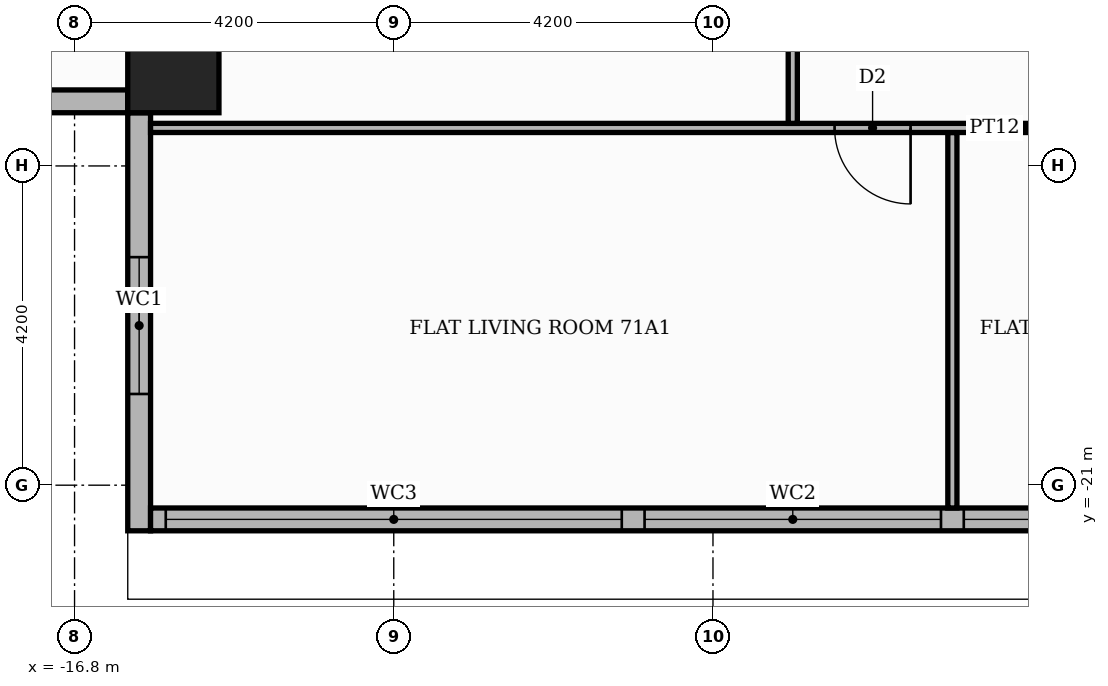
"""IFC4 building model, lengths in metres.
Left out: names, types, materials, properties, quantities, classifications, styles, units other than length and angle.
Written with IfcOpenShell. Run it as: python <this file> out.ifc"""

import sys

from ifc_helpers import new_model, si_unit, direction, frame, frame_2d, origin, origin_2d, place, context, subcontext, project, spatial, rectangle, extrude, element, fill, save


model = new_model("IFC4")
c1 = context("Model", 3, precision=1e-05, world=origin(), true_north=direction((0.0, 1.0)))
c2 = subcontext(c1, "Body", "Model", "MODEL_VIEW")
j1 = project(units=[si_unit("LENGTHUNIT", "METRE"), si_unit("PLANEANGLEUNIT", "RADIAN")], contexts=[c1])
p1 = place(None, origin())
s1 = spatial("IfcSite", under=j1, at=p1, CompositionType="ELEMENT")
p2 = place(p1, origin())
s2 = spatial("IfcBuilding", under=s1, at=p2, CompositionType="ELEMENT")
p3 = place(p2, frame((0.0, 0.0, 296.7)))
s3 = spatial("IfcBuildingStorey", under=s2, at=p3, CompositionType="ELEMENT", Elevation=296.7)
p4 = place(p3, frame((-15.5, -15.5, 0.0), z_axis=(0.0, 0.0, 1.0), x_axis=(1.0, 0.0, 0.0)))
e1 = element("IfcColumn", 1, at=p4, inside=s3, PredefinedType="COLUMN", context=c2, shape_type="SweptSolid", body=[
    extrude(rectangle(XDim=1.2, YDim=1.2, at=origin_2d()), origin(), (0.0, 0.0, 1.0), 3.9),
])
p5 = place(p3, frame((-21.3, -15.95, 0.0), z_axis=(0.0, 0.0, 1.0), x_axis=(1.0, 0.0, 0.0)))
e2 = element("IfcWall", 2, at=p5, inside=s3, PredefinedType="STANDARD", context=c2, shape_type="SweptSolid", body=[
    extrude(rectangle(XDim=5.2, YDim=0.3, at=frame_2d((2.6, 0.0))), origin(), (0.0, 0.0, 1.0), 3.55),
])
p6 = place(p5, frame((1.5, 0.0, 0.6)))
e3 = element("IfcOpeningElement", 3, at=p6, cuts=e2, PredefinedType="OPENING", context=c2, shape_type="SweptSolid", body=[
    extrude(rectangle(XDim=1.8, YDim=2.4, at=frame_2d((0.9, 1.2))), frame((0.0, 0.16, 0.0), z_axis=(0.0, -1.0, 0.0), x_axis=(1.0, 0.0, 0.0)), (0.0, 0.0, 1.0), 0.32),
])
p7 = place(p3, frame((-15.95, -16.1, 0.0), z_axis=(0.0, 0.0, 1.0), x_axis=(0.0, -1.0, 0.0)))
e4 = element("IfcWall", 4, at=p7, inside=s3, PredefinedType="STANDARD", context=c2, shape_type="SweptSolid", body=[
    extrude(rectangle(XDim=5.5, YDim=0.3, at=frame_2d((2.75, 0.0))), origin(), (0.0, 0.0, 1.0), 3.55),
])
p8 = place(p7, frame((1.9, 0.0, 0.6)))
e5 = element("IfcOpeningElement", 5, at=p8, cuts=e4, PredefinedType="OPENING", context=c2, shape_type="SweptSolid", body=[
    extrude(rectangle(XDim=1.8, YDim=2.4, at=frame_2d((0.9, 1.2))), frame((0.0, 0.16, 0.0), z_axis=(0.0, -1.0, 0.0), x_axis=(1.0, 0.0, 0.0)), (0.0, 0.0, 1.0), 0.32),
])
p9 = place(p3, frame((-15.8, -21.45, 0.0), z_axis=(0.0, 0.0, 1.0), x_axis=(1.0, 0.0, 0.0)))
e6 = element("IfcWall", 6, at=p9, inside=s3, PredefinedType="STANDARD", context=c2, shape_type="SweptSolid", body=[
    extrude(rectangle(XDim=31.9, YDim=0.3, at=frame_2d((15.95, 0.0))), origin(), (0.0, 0.0, 1.0), 3.55),
])
p10 = place(p9, frame((0.2, 0.0, 0.6)))
e7 = element("IfcOpeningElement", 7, at=p10, cuts=e6, PredefinedType="OPENING", context=c2, shape_type="SweptSolid", body=[
    extrude(rectangle(XDim=6.0, YDim=2.4, at=frame_2d((3.0, 1.2))), frame((0.0, 0.16, 0.0), z_axis=(0.0, -1.0, 0.0), x_axis=(1.0, 0.0, 0.0)), (0.0, 0.0, 1.0), 0.32),
])
p11 = place(p9, frame((6.5, 0.0, 0.6)))
e8 = element("IfcOpeningElement", 8, at=p11, cuts=e6, PredefinedType="OPENING", context=c2, shape_type="SweptSolid", body=[
    extrude(rectangle(XDim=3.9, YDim=2.4, at=frame_2d((1.95, 1.2))), frame((0.0, 0.16, 0.0), z_axis=(0.0, -1.0, 0.0), x_axis=(1.0, 0.0, 0.0)), (0.0, 0.0, 1.0), 0.32),
])
p12 = place(p9, frame((10.7, 0.0, 0.6)))
e9 = element("IfcOpeningElement", 9, at=p12, cuts=e6, PredefinedType="OPENING", context=c2, shape_type="SweptSolid", body=[
    extrude(rectangle(XDim=3.9, YDim=2.4, at=frame_2d((1.95, 1.2))), frame((0.0, 0.16, 0.0), z_axis=(0.0, -1.0, 0.0), x_axis=(1.0, 0.0, 0.0)), (0.0, 0.0, 1.0), 0.32),
])
p13 = place(p9, frame((14.9, 0.0, 0.6)))
e10 = element("IfcOpeningElement", 10, at=p13, cuts=e6, PredefinedType="OPENING", context=c2, shape_type="SweptSolid", body=[
    extrude(rectangle(XDim=3.9, YDim=2.4, at=frame_2d((1.95, 1.2))), frame((0.0, 0.16, 0.0), z_axis=(0.0, -1.0, 0.0), x_axis=(1.0, 0.0, 0.0)), (0.0, 0.0, 1.0), 0.32),
])
p14 = place(p9, frame((19.1, 0.0, 0.6)))
e11 = element("IfcOpeningElement", 11, at=p14, cuts=e6, PredefinedType="OPENING", context=c2, shape_type="SweptSolid", body=[
    extrude(rectangle(XDim=1.8, YDim=2.4, at=frame_2d((0.9, 1.2))), frame((0.0, 0.16, 0.0), z_axis=(0.0, -1.0, 0.0), x_axis=(1.0, 0.0, 0.0)), (0.0, 0.0, 1.0), 0.32),
])
p15 = place(p9, frame((21.2, 0.0, 0.6)))
e12 = element("IfcOpeningElement", 12, at=p15, cuts=e6, PredefinedType="OPENING", context=c2, shape_type="SweptSolid", body=[
    extrude(rectangle(XDim=1.8, YDim=2.4, at=frame_2d((0.9, 1.2))), frame((0.0, 0.16, 0.0), z_axis=(0.0, -1.0, 0.0), x_axis=(1.0, 0.0, 0.0)), (0.0, 0.0, 1.0), 0.32),
])
p16 = place(p9, frame((23.3, 0.0, 0.6)))
e13 = element("IfcOpeningElement", 13, at=p16, cuts=e6, PredefinedType="OPENING", context=c2, shape_type="SweptSolid", body=[
    extrude(rectangle(XDim=6.0, YDim=2.4, at=frame_2d((3.0, 1.2))), frame((0.0, 0.16, 0.0), z_axis=(0.0, -1.0, 0.0), x_axis=(1.0, 0.0, 0.0)), (0.0, 0.0, 1.0), 0.32),
])
p17 = place(p3, frame((-5.25, -21.3, 0.0), z_axis=(0.0, 0.0, 1.0), x_axis=(0.0, 1.0, 0.0)))
e14 = element("IfcWall", 14, at=p17, inside=s3, PredefinedType="PARTITIONING", context=c2, shape_type="SweptSolid", body=[
    extrude(rectangle(XDim=4.94, YDim=0.12, at=frame_2d((2.47, 0.0))), origin(), (0.0, 0.0, 1.0), 3.55),
])
p18 = place(p3, frame((-15.8, -16.3, 0.0), z_axis=(0.0, 0.0, 1.0), x_axis=(1.0, 0.0, 0.0)))
e15 = element("IfcWall", 15, at=p18, inside=s3, PredefinedType="PARTITIONING", context=c2, shape_type="SweptSolid", body=[
    extrude(rectangle(XDim=23.05, YDim=0.12, at=frame_2d((11.525, 0.0))), origin(), (0.0, 0.0, 1.0), 3.55),
])
p19 = place(p18, frame((9.0, 0.0, 0.0)))
e16 = element("IfcOpeningElement", 16, at=p19, cuts=e15, PredefinedType="OPENING", context=c2, shape_type="SweptSolid", body=[
    extrude(rectangle(XDim=1.0, YDim=2.1, at=frame_2d((0.5, 1.05))), frame((0.0, 0.07, 0.0), z_axis=(0.0, -1.0, 0.0), x_axis=(1.0, 0.0, 0.0)), (0.0, 0.0, 1.0), 0.14),
])
p20 = place(p18, frame((12.15, 0.0, 0.0)))
e17 = element("IfcOpeningElement", 17, at=p20, cuts=e15, PredefinedType="OPENING", context=c2, shape_type="SweptSolid", body=[
    extrude(rectangle(XDim=1.0, YDim=2.1, at=frame_2d((0.5, 1.05))), frame((0.0, 0.07, 0.0), z_axis=(0.0, -1.0, 0.0), x_axis=(1.0, 0.0, 0.0)), (0.0, 0.0, 1.0), 0.14),
])
p21 = place(p18, frame((16.4, 0.0, 0.0)))
e18 = element("IfcOpeningElement", 18, at=p21, cuts=e15, PredefinedType="OPENING", context=c2, shape_type="SweptSolid", body=[
    extrude(rectangle(XDim=0.9, YDim=2.1, at=frame_2d((0.45, 1.05))), frame((0.0, 0.07, 0.0), z_axis=(0.0, -1.0, 0.0), x_axis=(1.0, 0.0, 0.0)), (0.0, 0.0, 1.0), 0.14),
])
p22 = place(p3, frame((-7.35, -16.24, 0.0), z_axis=(0.0, 0.0, 1.0), x_axis=(0.0, 1.0, 0.0)))
e19 = element("IfcWall", 19, at=p22, inside=s3, PredefinedType="PARTITIONING", context=c2, shape_type="SweptSolid", body=[
    extrude(rectangle(XDim=8.79, YDim=0.12, at=frame_2d((4.395, 0.0))), origin(), (0.0, 0.0, 1.0), 3.55),
])
p23 = place(p22, frame((3.965, 0.0, 0.0)))
e20 = element("IfcOpeningElement", 20, at=p23, cuts=e19, PredefinedType="OPENING", context=c2, shape_type="SweptSolid", body=[
    extrude(rectangle(XDim=0.9, YDim=2.1, at=frame_2d((0.45, 1.05))), frame((0.0, 0.07, 0.0), z_axis=(0.0, -1.0, 0.0), x_axis=(1.0, 0.0, 0.0)), (0.0, 0.0, 1.0), 0.14),
])
p24 = place(p8, origin())
e21 = element("IfcWindow", 21, at=p24, inside=s3, PartitioningType="SINGLE_PANEL", PredefinedType="WINDOW", context=c2, shape_type="SweptSolid", body=[
    extrude(rectangle(XDim=1.8, YDim=2.4, at=frame_2d((0.9, 1.2))), frame((0.0, 0.03, 0.0), z_axis=(0.0, -1.0, 0.0), x_axis=(1.0, 0.0, 0.0)), (0.0, 0.0, 1.0), 0.06),
])
fill(e5, e21)
p25 = place(p10, origin())
e22 = element("IfcWindow", 22, at=p25, inside=s3, PartitioningType="SINGLE_PANEL", PredefinedType="WINDOW", context=c2, shape_type="SweptSolid", body=[
    extrude(rectangle(XDim=6.0, YDim=2.4, at=frame_2d((3.0, 1.2))), frame((0.0, 0.03, 0.0), z_axis=(0.0, -1.0, 0.0), x_axis=(1.0, 0.0, 0.0)), (0.0, 0.0, 1.0), 0.06),
])
fill(e7, e22)
p26 = place(p11, origin())
e23 = element("IfcWindow", 23, at=p26, inside=s3, PartitioningType="SINGLE_PANEL", PredefinedType="WINDOW", context=c2, shape_type="SweptSolid", body=[
    extrude(rectangle(XDim=3.9, YDim=2.4, at=frame_2d((1.95, 1.2))), frame((0.0, 0.03, 0.0), z_axis=(0.0, -1.0, 0.0), x_axis=(1.0, 0.0, 0.0)), (0.0, 0.0, 1.0), 0.06),
])
fill(e8, e23)
p27 = place(p12, origin())
e24 = element("IfcWindow", 24, at=p27, inside=s3, PartitioningType="SINGLE_PANEL", PredefinedType="WINDOW", context=c2, shape_type="SweptSolid", body=[
    extrude(rectangle(XDim=3.9, YDim=2.4, at=frame_2d((1.95, 1.2))), frame((0.0, 0.03, 0.0), z_axis=(0.0, -1.0, 0.0), x_axis=(1.0, 0.0, 0.0)), (0.0, 0.0, 1.0), 0.06),
])
fill(e9, e24)
p28 = place(p19, frame((1.0, 0.0, 0.0), z_axis=(0.0, 0.0, 1.0), x_axis=(-1.0, 0.0, 0.0)))
e25 = element("IfcDoor", 25, at=p28, inside=s3, OperationType="SINGLE_SWING_RIGHT", PredefinedType="DOOR", context=c2, shape_type="SweptSolid", body=[
    extrude(rectangle(XDim=1.0, YDim=2.1, at=frame_2d((0.5, 1.05))), frame((0.0, 0.025, 0.0), z_axis=(0.0, -1.0, 0.0), x_axis=(1.0, 0.0, 0.0)), (0.0, 0.0, 1.0), 0.05),
])
fill(e16, e25)
save(model, sys.argv[1])
